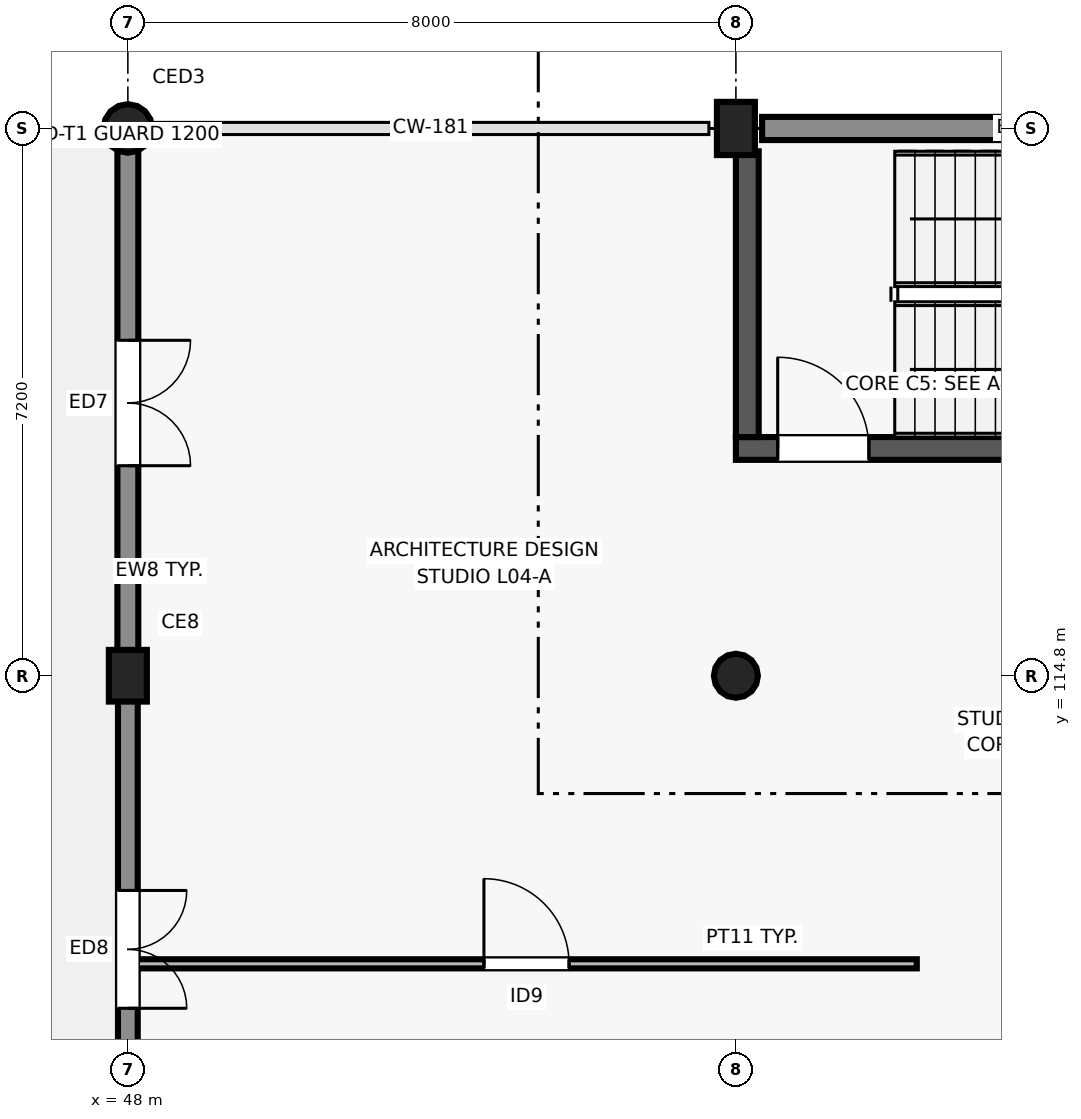
"""IFC4 building model, lengths in metres.
Left out: names, types, materials, properties, quantities, classifications, styles, units other than length and angle.
Written with IfcOpenShell. Run it as: python <this file> out.ifc"""

import sys

from ifc_helpers import new_model, si_unit, direction, frame, frame_2d, origin, origin_2d, place, context, subcontext, project, spatial, rectangle, circle, extrude, element, fill, save


model = new_model("IFC4")
c1 = context("Model", 3, precision=1e-05, world=origin(), true_north=direction((0.0, 1.0)))
c2 = subcontext(c1, "Body", "Model", "MODEL_VIEW")
j1 = project(units=[si_unit("LENGTHUNIT", "METRE"), si_unit("PLANEANGLEUNIT", "RADIAN")], contexts=[c1])
p1 = place(None, origin())
s1 = spatial("IfcSite", under=j1, at=p1, CompositionType="ELEMENT")
p2 = place(p1, origin())
s2 = spatial("IfcBuilding", under=s1, at=p2, CompositionType="ELEMENT")
p3 = place(p2, frame((0.0, 0.0, 17.4)))
s3 = spatial("IfcBuildingStorey", under=s2, at=p3, CompositionType="ELEMENT", Elevation=17.4)
p4 = place(p3, frame((48.0, 114.8, 0.0), z_axis=(0.0, 0.0, 1.0), x_axis=(1.0, 0.0, 0.0)))
e1 = element("IfcColumn", 1, at=p4, inside=s3, PredefinedType="COLUMN", context=c2, shape_type="SweptSolid", body=[
    extrude(rectangle(XDim=0.68, YDim=0.5, at=origin_2d()), origin(), (0.0, 0.0, 1.0), 4.2),
])
p5 = place(p3, frame((48.0, 122.0, 0.0), z_axis=(0.0, 0.0, 1.0), x_axis=(1.0, 0.0, 0.0)))
e2 = element("IfcColumn", 2, at=p5, inside=s3, PredefinedType="COLUMN", context=c2, shape_type="SweptSolid", body=[
    extrude(circle(Radius=0.32, at=origin_2d()), origin(), (0.0, 0.0, 1.0), 4.2),
])
p6 = place(p3, frame((56.0, 114.8, 0.0), z_axis=(0.0, 0.0, 1.0), x_axis=(1.0, 0.0, 0.0)))
e3 = element("IfcColumn", 3, at=p6, inside=s3, PredefinedType="COLUMN", context=c2, shape_type="SweptSolid", body=[
    extrude(circle(Radius=0.29, at=origin_2d()), origin(), (0.0, 0.0, 1.0), 4.2),
])
p7 = place(p3, frame((56.0, 122.0, 0.0), z_axis=(0.0, 0.0, 1.0), x_axis=(1.0, 0.0, 0.0)))
e4 = element("IfcColumn", 4, at=p7, inside=s3, PredefinedType="COLUMN", context=c2, shape_type="SweptSolid", body=[
    extrude(rectangle(XDim=0.7, YDim=0.5, at=origin_2d()), origin(), (0.0, 0.0, 1.0), 4.2),
])
p8 = place(p3, frame((63.665, 122.0, 0.0), z_axis=(0.0, 0.0, 1.0), x_axis=(-1.0, 0.0, 0.0)))
e5 = element("IfcWall", 5, at=p8, inside=s3, PredefinedType="SOLIDWALL", context=c2, shape_type="SweptSolid", body=[
    extrude(rectangle(XDim=7.32, YDim=0.305, at=frame_2d((3.66, 0.0))), origin(), (0.0, 0.0, 1.0), 3.92),
])
p9 = place(p3, frame((48.0, 121.731, 0.0), z_axis=(0.0, 0.0, 1.0), x_axis=(0.0, -1.0, 0.0)))
e6 = element("IfcWall", 6, at=p9, inside=s3, PredefinedType="SOLIDWALL", context=c2, shape_type="SweptSolid", body=[
    extrude(rectangle(XDim=6.686, YDim=0.275, at=frame_2d((3.343, 0.0))), origin(), (0.0, 0.0, 1.0), 3.51),
])
p10 = place(p9, frame((2.518, 0.0, 0.0)))
e7 = element("IfcOpeningElement", 7, at=p10, cuts=e6, PredefinedType="OPENING", context=c2, shape_type="SweptSolid", body=[
    extrude(rectangle(XDim=1.65, YDim=2.2, at=frame_2d((0.825, 1.1))), frame((0.0, 0.147, 0.0), z_axis=(0.0, -1.0, 0.0), x_axis=(1.0, 0.0, 0.0)), (0.0, 0.0, 1.0), 0.295),
])
p11 = place(p3, frame((48.0, 114.555, 0.0), z_axis=(0.0, 0.0, 1.0), x_axis=(0.0, -1.0, 0.0)))
e8 = element("IfcWall", 8, at=p11, inside=s3, PredefinedType="SOLIDWALL", context=c2, shape_type="SweptSolid", body=[
    extrude(rectangle(XDim=6.71, YDim=0.26, at=frame_2d((3.355, 0.0))), origin(), (0.0, 0.0, 1.0), 3.45),
])
p12 = place(p11, frame((2.58, 0.0, 0.0)))
e9 = element("IfcOpeningElement", 9, at=p12, cuts=e8, PredefinedType="OPENING", context=c2, shape_type="SweptSolid", body=[
    extrude(rectangle(XDim=1.55, YDim=2.2, at=frame_2d((0.775, 1.1))), frame((0.0, 0.14, 0.0), z_axis=(0.0, -1.0, 0.0), x_axis=(1.0, 0.0, 0.0)), (0.0, 0.0, 1.0), 0.28),
])
p13 = place(p3, frame((56.0, 117.79, 0.0), z_axis=(0.0, 0.0, 1.0), x_axis=(1.0, 0.0, 0.0)))
e10 = element("IfcWall", 10, at=p13, inside=s3, PredefinedType="SHEAR", context=c2, shape_type="SweptSolid", body=[
    extrude(rectangle(XDim=8.0, YDim=0.3, at=frame_2d((4.0, 0.0))), origin(), (0.0, 0.0, 1.0), 3.92),
])
p14 = place(p13, frame((0.55, 0.0, 0.0)))
e11 = element("IfcOpeningElement", 11, at=p14, cuts=e10, PredefinedType="OPENING", context=c2, shape_type="SweptSolid", body=[
    extrude(rectangle(XDim=1.2, YDim=2.2, at=frame_2d((0.6, 1.1))), frame((0.0, 0.16, 0.0), z_axis=(0.0, -1.0, 0.0), x_axis=(1.0, 0.0, 0.0)), (0.0, 0.0, 1.0), 0.32),
])
p15 = place(p3, frame((56.15, 117.94, 0.0), z_axis=(0.0, 0.0, 1.0), x_axis=(0.0, 1.0, 0.0)))
e12 = element("IfcWall", 12, at=p15, inside=s3, PredefinedType="SHEAR", context=c2, shape_type="SweptSolid", body=[
    extrude(rectangle(XDim=3.76, YDim=0.3, at=frame_2d((1.88, 0.0))), origin(), (0.0, 0.0, 1.0), 3.92),
])
p16 = place(p3, frame((48.11, 111.01, 0.0), z_axis=(0.0, 0.0, 1.0), x_axis=(1.0, 0.0, 0.0)))
e13 = element("IfcWall", 13, at=p16, inside=s3, PredefinedType="PARTITIONING", context=c2, shape_type="SweptSolid", body=[
    extrude(rectangle(XDim=10.27, YDim=0.12, at=frame_2d((5.135, 0.0))), origin(), (0.0, 0.0, 1.0), 3.9),
])
p17 = place(p16, frame((4.575, 0.0, 0.0)))
e14 = element("IfcOpeningElement", 14, at=p17, cuts=e13, PredefinedType="OPENING", context=c2, shape_type="SweptSolid", body=[
    extrude(rectangle(XDim=1.12, YDim=2.2, at=frame_2d((0.56, 1.1))), frame((0.0, 0.07, 0.0), z_axis=(0.0, -1.0, 0.0), x_axis=(1.0, 0.0, 0.0)), (0.0, 0.0, 1.0), 0.14),
])
p18 = place(p10, frame((1.65, 0.0, 0.0), z_axis=(0.0, 0.0, 1.0), x_axis=(-1.0, 0.0, 0.0)))
e15 = element("IfcDoor", 15, at=p18, inside=s3, OperationType="DOUBLE_DOOR_SINGLE_SWING", PredefinedType="DOOR", context=c2, shape_type="SweptSolid", body=[
    extrude(rectangle(XDim=1.65, YDim=2.2, at=frame_2d((0.825, 1.1))), frame((0.0, 0.025, 0.0), z_axis=(0.0, -1.0, 0.0), x_axis=(1.0, 0.0, 0.0)), (0.0, 0.0, 1.0), 0.05),
])
fill(e7, e15)
p19 = place(p12, frame((1.55, 0.0, 0.0), z_axis=(0.0, 0.0, 1.0), x_axis=(-1.0, 0.0, 0.0)))
e16 = element("IfcDoor", 16, at=p19, inside=s3, OperationType="DOUBLE_DOOR_SINGLE_SWING", PredefinedType="DOOR", context=c2, shape_type="SweptSolid", body=[
    extrude(rectangle(XDim=1.55, YDim=2.2, at=frame_2d((0.775, 1.1))), frame((0.0, 0.025, 0.0), z_axis=(0.0, -1.0, 0.0), x_axis=(1.0, 0.0, 0.0)), (0.0, 0.0, 1.0), 0.05),
])
fill(e9, e16)
p20 = place(p14, origin())
e17 = element("IfcDoor", 17, at=p20, inside=s3, OperationType="SINGLE_SWING_LEFT", PredefinedType="DOOR", context=c2, shape_type="SweptSolid", body=[
    extrude(rectangle(XDim=1.2, YDim=2.2, at=frame_2d((0.6, 1.1))), frame((0.0, 0.025, 0.0), z_axis=(0.0, -1.0, 0.0), x_axis=(1.0, 0.0, 0.0)), (0.0, 0.0, 1.0), 0.05),
])
fill(e11, e17)
p21 = place(p17, origin())
e18 = element("IfcDoor", 18, at=p21, inside=s3, OperationType="SINGLE_SWING_LEFT", PredefinedType="DOOR", context=c2, shape_type="SweptSolid", body=[
    extrude(rectangle(XDim=1.12, YDim=2.2, at=frame_2d((0.56, 1.1))), frame((0.0, 0.025, 0.0), z_axis=(0.0, -1.0, 0.0), x_axis=(1.0, 0.0, 0.0)), (0.0, 0.0, 1.0), 0.05),
])
fill(e14, e18)
save(model, sys.argv[1])
